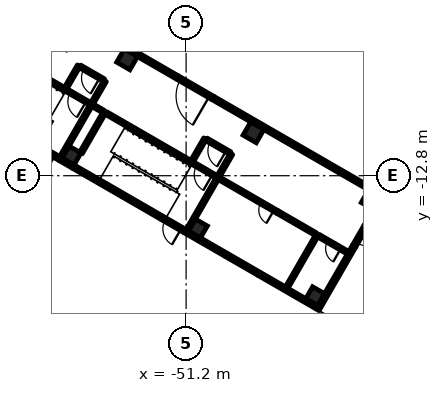
"""IFC4 building model, lengths in metres.
Left out: names, types, materials, properties, quantities, classifications, styles, units other than length and angle.
Written with IfcOpenShell. Run it as: python <this file> out.ifc"""

import sys

from ifc_helpers import new_model, si_unit, direction, frame, frame_2d, origin, origin_2d, place, context, subcontext, project, spatial, rectangle, extrude, element, fill, save


model = new_model("IFC4")
c1 = context("Model", 3, precision=1e-05, world=origin(), true_north=direction((0.0, 1.0)))
c2 = subcontext(c1, "Body", "Model", "MODEL_VIEW")
j1 = project(units=[si_unit("LENGTHUNIT", "METRE"), si_unit("PLANEANGLEUNIT", "RADIAN")], contexts=[c1])
p1 = place(None, origin())
s1 = spatial("IfcSite", under=j1, at=p1, CompositionType="ELEMENT")
p2 = place(p1, origin())
s2 = spatial("IfcBuilding", under=s1, at=p2, CompositionType="ELEMENT")
p3 = place(p2, origin())
s3 = spatial("IfcBuildingStorey", under=s2, at=p3, CompositionType="ELEMENT", Elevation=0.0)
p4 = place(p3, frame((-39.061, -14.399, -0.3), z_axis=(0.0, 0.0, 1.0), x_axis=(-0.5, -0.866025403784, 0.0)))
e1 = element("IfcColumn", 1, at=p4, inside=s3, PredefinedType="COLUMN", context=c2, shape_type="SweptSolid", body=[
    extrude(rectangle(XDim=0.9, YDim=0.9, at=origin_2d()), origin(), (0.0, 0.0, 1.0), 6.3),
])
for number, where, z_axis, x_axis in (
    (2, (-46.768, -9.949, -0.3), (0.0, 0.0, 1.0), (-0.5, -0.866, 0.0)),
    (3, (-55.082, -5.149, -0.3), (0.0, 0.0, 1.0), (-0.5, -0.866, 0.0)),
):
    element("IfcColumn", number, at=place(p3, frame(where, z_axis=z_axis, x_axis=x_axis)), inside=s3, PredefinedType="COLUMN", context=c2, shape_type="SweptSolid", body=[
        extrude(rectangle(XDim=1.0, YDim=1.0, at=origin_2d()), origin(), (0.0, 0.0, 1.0), 6.3),
    ])
for number, where, z_axis, x_axis in (
    (4, (-42.71, -20.721, -0.3), (0.0, 0.0, 1.0), (-0.5, -0.866, 0.0)),
    (5, (-50.418, -16.271, -0.3), (0.0, 0.0, 1.0), (-0.5, -0.866, 0.0)),
    (6, (-58.732, -11.471, -0.3), (0.0, 0.0, 1.0), (-0.5, -0.866, 0.0)),
):
    element("IfcColumn", number, at=place(p3, frame(where, z_axis=z_axis, x_axis=x_axis)), inside=s3, PredefinedType="COLUMN", context=c2, shape_type="SweptSolid", body=[
        extrude(rectangle(XDim=0.9, YDim=0.9, at=origin_2d()), origin(), (0.0, 0.0, 1.0), 6.3),
    ])
p5 = place(p3, frame((-38.988, -15.423, 0.0), z_axis=(0.0, 0.0, 1.0), x_axis=(-0.500077740698, -0.865980515519, 0.0)))
e7 = element("IfcWall", 7, at=p5, inside=s3, PredefinedType="SOLIDWALL", context=c2, shape_type="SweptSolid", body=[
    extrude(rectangle(XDim=2.3, YDim=0.25, at=frame_2d((1.15, 0.0))), origin(), (0.0, 0.0, 1.0), 5.7),
])
p6 = place(p5, frame((0.25, 0.0, 0.0)))
e8 = element("IfcOpeningElement", 8, at=p6, cuts=e7, PredefinedType="OPENING", context=c2, shape_type="SweptSolid", body=[
    extrude(rectangle(XDim=1.8, YDim=2.1, at=frame_2d((0.9, 1.05))), frame((0.0, 0.135, 0.0), z_axis=(0.0, -1.0, 0.0), x_axis=(1.0, 0.0, 0.0)), (0.0, 0.0, 1.0), 0.27),
])
p7 = place(p3, frame((-40.138, -17.414, 0.0), z_axis=(0.0, 0.0, 1.0), x_axis=(-0.499972286653, -0.866041403502, 0.0)))
e9 = element("IfcWall", 9, at=p7, inside=s3, PredefinedType="SOLIDWALL", context=c2, shape_type="SweptSolid", body=[
    extrude(rectangle(XDim=4.85, YDim=0.25, at=frame_2d((2.425, 0.0))), origin(), (0.0, 0.0, 1.0), 5.7),
])
p8 = place(p3, frame((-42.608, -21.444, 0.0), z_axis=(0.0, 0.0, 1.0), x_axis=(-0.866022959057, 0.500004234368, 0.0)))
e10 = element("IfcWall", 10, at=p8, inside=s3, PredefinedType="SOLIDWALL", context=c2, shape_type="SweptSolid", body=[
    extrude(rectangle(XDim=4.375, YDim=0.25, at=frame_2d((2.188, 0.0))), origin(), (0.0, 0.0, 1.0), 5.7),
])
p9 = place(p3, frame((-46.397, -19.256, 0.0), z_axis=(0.0, 0.0, 1.0), x_axis=(-0.866022959057, 0.500004234368, 0.0)))
e11 = element("IfcWall", 11, at=p9, inside=s3, PredefinedType="SOLIDWALL", context=c2, shape_type="SweptSolid", body=[
    extrude(rectangle(XDim=2.5, YDim=0.25, at=frame_2d((1.25, 0.0))), origin(), (0.0, 0.0, 1.0), 5.7),
])
p10 = place(p9, frame((0.25, 0.0, 0.3)))
e12 = element("IfcOpeningElement", 12, at=p10, cuts=e11, PredefinedType="OPENING", context=c2, shape_type="SweptSolid", body=[
    extrude(rectangle(XDim=2.0, YDim=2.4, at=frame_2d((1.0, 1.2))), frame((0.0, 0.135, 0.0), z_axis=(0.0, -1.0, 0.0), x_axis=(1.0, 0.0, 0.0)), (0.0, 0.0, 1.0), 0.27),
])
p11 = place(p3, frame((-48.562, -18.006, 0.0), z_axis=(0.0, 0.0, 1.0), x_axis=(-0.866015284814, 0.500017526161, 0.0)))
e13 = element("IfcWall", 13, at=p11, inside=s3, PredefinedType="SOLIDWALL", context=c2, shape_type="SweptSolid", body=[
    extrude(rectangle(XDim=3.175, YDim=0.25, at=frame_2d((1.588, 0.0))), origin(), (0.0, 0.0, 1.0), 5.7),
])
p12 = place(p3, frame((-51.312, -16.419, 0.0), z_axis=(0.0, 0.0, 1.0), x_axis=(-0.86605165483, 0.499954529098, 0.0)))
e14 = element("IfcWall", 14, at=p12, inside=s3, PredefinedType="SOLIDWALL", context=c2, shape_type="SweptSolid", body=[
    extrude(rectangle(XDim=1.7, YDim=0.25, at=frame_2d((0.85, 0.0))), origin(), (0.0, 0.0, 1.0), 5.7),
])
p13 = place(p12, frame((0.25, 0.0, 0.0)))
e15 = element("IfcOpeningElement", 15, at=p13, cuts=e14, PredefinedType="OPENING", context=c2, shape_type="SweptSolid", body=[
    extrude(rectangle(XDim=1.2, YDim=2.1, at=frame_2d((0.6, 1.05))), frame((0.0, 0.135, 0.0), z_axis=(0.0, -1.0, 0.0), x_axis=(1.0, 0.0, 0.0)), (0.0, 0.0, 1.0), 0.27),
])
p14 = place(p3, frame((-52.784, -15.569, 0.0), z_axis=(0.0, 0.0, 1.0), x_axis=(-0.866026575979, 0.499997969693, 0.0)))
e16 = element("IfcWall", 16, at=p14, inside=s3, PredefinedType="SOLIDWALL", context=c2, shape_type="SweptSolid", body=[
    extrude(rectangle(XDim=6.75, YDim=0.25, at=frame_2d((3.375, 0.0))), origin(), (0.0, 0.0, 1.0), 5.7),
])
p15 = place(p3, frame((-59.496, -11.694, 0.0), z_axis=(0.0, 0.0, 1.0), x_axis=(-0.866000971088, 0.500042316284, 0.0)))
e17 = element("IfcWall", 17, at=p15, inside=s3, PredefinedType="SOLIDWALL", context=c2, shape_type="SweptSolid", body=[
    extrude(rectangle(XDim=1.85, YDim=0.25, at=frame_2d((0.925, 0.0))), origin(), (0.0, 0.0, 1.0), 5.7),
])
p16 = place(p15, frame((0.4, 0.0, 0.0)))
e18 = element("IfcOpeningElement", 18, at=p16, cuts=e17, PredefinedType="OPENING", context=c2, shape_type="SweptSolid", body=[
    extrude(rectangle(XDim=1.2, YDim=2.1, at=frame_2d((0.6, 1.05))), frame((0.0, 0.135, 0.0), z_axis=(0.0, -1.0, 0.0), x_axis=(1.0, 0.0, 0.0)), (0.0, 0.0, 1.0), 0.27),
])
p17 = place(p3, frame((-58.63, -12.194, 0.0), z_axis=(0.0, 0.0, 1.0), x_axis=(-0.866010750942, 0.50002537861, 0.0)))
e19 = element("IfcWall", 19, at=p17, inside=s3, PredefinedType="SOLIDWALL", context=c2, shape_type="SweptSolid", body=[
    extrude(rectangle(XDim=1.0, YDim=0.25, at=frame_2d((0.5, 0.0))), origin(), (0.0, 0.0, 1.0), 5.7),
])
p18 = place(p3, frame((-49.119, -12.921, 0.0), z_axis=(0.0, 0.0, 1.0), x_axis=(-0.49999894854, -0.866026010844, 0.0)))
e20 = element("IfcWall", 20, at=p18, inside=s3, PredefinedType="SOLIDWALL", context=c2, shape_type="SweptSolid", body=[
    extrude(rectangle(XDim=4.0, YDim=0.2, at=frame_2d((2.0, 0.0))), origin(), (0.0, 0.0, 1.0), 5.7),
])
p19 = place(p3, frame((-56.567, -8.621, 0.0), z_axis=(0.0, 0.0, 1.0), x_axis=(-0.499933790963, -0.866063626216, 0.0)))
e21 = element("IfcWall", 21, at=p19, inside=s3, PredefinedType="SOLIDWALL", context=c2, shape_type="SweptSolid", body=[
    extrude(rectangle(XDim=3.1, YDim=0.2, at=frame_2d((1.55, 0.0))), origin(), (0.0, 0.0, 1.0), 5.7),
])
p20 = place(p3, frame((-57.433, -8.121, 0.0), z_axis=(0.0, 0.0, 1.0), x_axis=(-0.49999894854, -0.866026010844, 0.0)))
e22 = element("IfcWall", 22, at=p20, inside=s3, PredefinedType="SOLIDWALL", context=c2, shape_type="SweptSolid", body=[
    extrude(rectangle(XDim=4.0, YDim=0.2, at=frame_2d((2.0, 0.0))), origin(), (0.0, 0.0, 1.0), 5.7),
])
p21 = place(p3, frame((-49.206, -12.871, 0.0), z_axis=(0.0, 0.0, 1.0), x_axis=(-0.866036909293, 0.499980071345, 0.0)))
e23 = element("IfcWall", 23, at=p21, inside=s3, PredefinedType="SOLIDWALL", context=c2, shape_type="SweptSolid", body=[
    extrude(rectangle(XDim=1.75, YDim=0.2, at=frame_2d((0.875, 0.0))), origin(), (0.0, 0.0, 1.0), 5.7),
])
p22 = place(p21, frame((0.3, 0.0, 0.0)))
e24 = element("IfcOpeningElement", 24, at=p22, cuts=e23, PredefinedType="OPENING", context=c2, shape_type="SweptSolid", body=[
    extrude(rectangle(XDim=1.2, YDim=2.1, at=frame_2d((0.6, 1.05))), frame((0.0, 0.11, 0.0), z_axis=(0.0, -1.0, 0.0), x_axis=(1.0, 0.0, 0.0)), (0.0, 0.0, 1.0), 0.22),
])
p23 = place(p3, frame((-50.722, -11.996, 0.0), z_axis=(0.0, 0.0, 1.0), x_axis=(-0.866027239912, 0.49999681972, 0.0)))
e25 = element("IfcWall", 25, at=p23, inside=s3, PredefinedType="SOLIDWALL", context=c2, shape_type="SweptSolid", body=[
    extrude(rectangle(XDim=6.65, YDim=0.2, at=frame_2d((3.325, 0.0))), origin(), (0.0, 0.0, 1.0), 5.7),
])
p24 = place(p3, frame((-57.52, -8.071, 0.0), z_axis=(0.0, 0.0, 1.0), x_axis=(-0.866002029911, 0.500040482552, 0.0)))
e26 = element("IfcWall", 26, at=p24, inside=s3, PredefinedType="SOLIDWALL", context=c2, shape_type="SweptSolid", body=[
    extrude(rectangle(XDim=1.75, YDim=0.2, at=frame_2d((0.875, 0.0))), origin(), (0.0, 0.0, 1.0), 5.7),
])
p25 = place(p24, frame((0.3, 0.0, 0.0)))
e27 = element("IfcOpeningElement", 27, at=p25, cuts=e26, PredefinedType="OPENING", context=c2, shape_type="SweptSolid", body=[
    extrude(rectangle(XDim=1.2, YDim=2.1, at=frame_2d((0.6, 1.05))), frame((0.0, 0.11, 0.0), z_axis=(0.0, -1.0, 0.0), x_axis=(1.0, 0.0, 0.0)), (0.0, 0.0, 1.0), 0.22),
])
p26 = place(p3, frame((-59.035, -7.196, 0.0), z_axis=(0.0, 0.0, 1.0), x_axis=(-0.866027239912, 0.49999681972, 0.0)))
e28 = element("IfcWall", 28, at=p26, inside=s3, PredefinedType="SOLIDWALL", context=c2, shape_type="SweptSolid", body=[
    extrude(rectangle(XDim=6.65, YDim=0.2, at=frame_2d((3.325, 0.0))), origin(), (0.0, 0.0, 1.0), 5.7),
])
for number, where, z_axis, x_axis in (
    (29, (-48.219, -11.363, 0.0), (0.0, 0.0, 1.0), (-0.5, -0.866, 0.0)),
    (30, (-49.951, -10.363, 0.0), (0.0, 0.0, 1.0), (-0.5, -0.866, 0.0)),
):
    element("IfcWall", number, at=place(p3, frame(where, z_axis=z_axis, x_axis=x_axis)), inside=s3, PredefinedType="PARTITIONING", context=c2, shape_type="SweptSolid", body=[
        extrude(rectangle(XDim=1.7, YDim=0.2, at=frame_2d((0.85, 0.0))), origin(), (0.0, 0.0, 1.0), 5.1),
    ])
for number, where, z_axis, x_axis in (
    (31, (-56.533, -6.562, 0.0), (0.0, 0.0, 1.0), (-0.5, -0.866, 0.0)),
    (32, (-58.265, -5.562, 0.0), (0.0, 0.0, 1.0), (-0.5, -0.866, 0.0)),
):
    element("IfcWall", number, at=place(p3, frame(where, z_axis=z_axis, x_axis=x_axis)), inside=s3, PredefinedType="PARTITIONING", context=c2, shape_type="SweptSolid", body=[
        extrude(rectangle(XDim=1.7, YDim=0.2, at=frame_2d((0.85, 0.0))), origin(), (0.0, 0.0, 1.0), 5.1),
    ])
p27 = place(p3, frame((-48.306, -11.312, 0.0), z_axis=(0.0, 0.0, 1.0), x_axis=(-0.866047807691, 0.499961193289, 0.0)))
e33 = element("IfcWall", 33, at=p27, inside=s3, PredefinedType="PARTITIONING", context=c2, shape_type="SweptSolid", body=[
    extrude(rectangle(XDim=1.8, YDim=0.2, at=frame_2d((0.9, 0.0))), origin(), (0.0, 0.0, 1.0), 5.1),
])
p28 = place(p27, frame((0.3, 0.0, 0.0)))
e34 = element("IfcOpeningElement", 34, at=p28, cuts=e33, PredefinedType="OPENING", context=c2, shape_type="SweptSolid", body=[
    extrude(rectangle(XDim=1.2, YDim=2.1, at=frame_2d((0.6, 1.05))), frame((0.0, 0.11, 0.0), z_axis=(0.0, -1.0, 0.0), x_axis=(1.0, 0.0, 0.0)), (0.0, 0.0, 1.0), 0.22),
])
p29 = place(p3, frame((-56.62, -6.513, 0.0), z_axis=(0.0, 0.0, 1.0), x_axis=(-0.865989075817, 0.500062916607, 0.0)))
e35 = element("IfcWall", 35, at=p29, inside=s3, PredefinedType="PARTITIONING", context=c2, shape_type="SweptSolid", body=[
    extrude(rectangle(XDim=1.8, YDim=0.2, at=frame_2d((0.9, 0.0))), origin(), (0.0, 0.0, 1.0), 5.1),
])
p30 = place(p29, frame((0.3, 0.0, 0.0)))
e36 = element("IfcOpeningElement", 36, at=p30, cuts=e35, PredefinedType="OPENING", context=c2, shape_type="SweptSolid", body=[
    extrude(rectangle(XDim=1.2, YDim=2.1, at=frame_2d((0.6, 1.05))), frame((0.0, 0.11, 0.0), z_axis=(0.0, -1.0, 0.0), x_axis=(1.0, 0.0, 0.0)), (0.0, 0.0, 1.0), 0.22),
])
p31 = place(p3, frame((-38.358, -14.083, 0.0), z_axis=(0.0, 0.0, 1.0), x_axis=(-0.866025499775, 0.499999833739, 0.0)))
e37 = element("IfcWall", 37, at=p31, inside=s3, PredefinedType="SOLIDWALL", context=c2, shape_type="SweptSolid", body=[
    extrude(rectangle(XDim=12.8, YDim=0.25, at=frame_2d((6.4, 0.0))), origin(), (0.0, 0.0, 1.0), 5.1),
])
p32 = place(p3, frame((-49.443, -7.683, 0.0), z_axis=(0.0, 0.0, 1.0), x_axis=(-0.866019956843, 0.50000943426, 0.0)))
e38 = element("IfcWall", 38, at=p32, inside=s3, PredefinedType="SOLIDWALL", context=c2, shape_type="SweptSolid", body=[
    extrude(rectangle(XDim=2.7, YDim=0.25, at=frame_2d((1.35, 0.0))), origin(), (0.0, 0.0, 1.0), 5.1),
])
p33 = place(p32, frame((0.25, 0.0, 0.0)))
e39 = element("IfcOpeningElement", 39, at=p33, cuts=e38, PredefinedType="OPENING", context=c2, shape_type="SweptSolid", body=[
    extrude(rectangle(XDim=2.2, YDim=2.1, at=frame_2d((1.1, 1.05))), frame((0.0, 0.135, 0.0), z_axis=(0.0, -1.0, 0.0), x_axis=(1.0, 0.0, 0.0)), (0.0, 0.0, 1.0), 0.27),
])
p34 = place(p3, frame((-51.782, -6.333, 0.0), z_axis=(0.0, 0.0, 1.0), x_axis=(-0.866028853923, 0.499994024137, 0.0)))
e40 = element("IfcWall", 40, at=p34, inside=s3, PredefinedType="SOLIDWALL", context=c2, shape_type="SweptSolid", body=[
    extrude(rectangle(XDim=6.9, YDim=0.25, at=frame_2d((3.45, 0.0))), origin(), (0.0, 0.0, 1.0), 5.1),
])
p35 = place(p3, frame((-42.581, -16.696, 0.0), z_axis=(0.0, 0.0, 1.0), x_axis=(-0.49999894854, -0.866026010844, 0.0)))
e41 = element("IfcWall", 41, at=p35, inside=s3, PredefinedType="PARTITIONING", context=c2, shape_type="SweptSolid", body=[
    extrude(rectangle(XDim=4.0, YDim=0.2, at=frame_2d((2.0, 0.0))), origin(), (0.0, 0.0, 1.0), 5.1),
])
p36 = place(p3, frame((-40.546, -17.871, 0.0), z_axis=(0.0, 0.0, 1.0), x_axis=(-0.866017533419, 0.500013631625, 0.0)))
e42 = element("IfcWall", 42, at=p36, inside=s3, PredefinedType="PARTITIONING", context=c2, shape_type="SweptSolid", body=[
    extrude(rectangle(XDim=2.25, YDim=0.2, at=frame_2d((1.125, 0.0))), origin(), (0.0, 0.0, 1.0), 5.1),
])
p37 = place(p36, frame((0.55, 0.0, 0.0)))
e43 = element("IfcOpeningElement", 43, at=p37, cuts=e42, PredefinedType="OPENING", context=c2, shape_type="SweptSolid", body=[
    extrude(rectangle(XDim=1.0, YDim=2.1, at=frame_2d((0.5, 1.05))), frame((0.0, 0.11, 0.0), z_axis=(0.0, -1.0, 0.0), x_axis=(1.0, 0.0, 0.0)), (0.0, 0.0, 1.0), 0.22),
])
p38 = place(p3, frame((-42.667, -16.646, 0.0), z_axis=(0.0, 0.0, 1.0), x_axis=(-0.86601045545, 0.500025890382, 0.0)))
e44 = element("IfcWall", 44, at=p38, inside=s3, PredefinedType="PARTITIONING", context=c2, shape_type="SweptSolid", body=[
    extrude(rectangle(XDim=2.925, YDim=0.2, at=frame_2d((1.462, 0.0))), origin(), (0.0, 0.0, 1.0), 5.1),
])
p39 = place(p3, frame((-45.201, -15.184, 0.0), z_axis=(0.0, 0.0, 1.0), x_axis=(-0.866031096941, 0.499990139034, 0.0)))
e45 = element("IfcWall", 45, at=p39, inside=s3, PredefinedType="PARTITIONING", context=c2, shape_type="SweptSolid", body=[
    extrude(rectangle(XDim=1.5, YDim=0.2, at=frame_2d((0.75, 0.0))), origin(), (0.0, 0.0, 1.0), 5.1),
])
p40 = place(p39, frame((0.25, 0.0, 0.0)))
e46 = element("IfcOpeningElement", 46, at=p40, cuts=e45, PredefinedType="OPENING", context=c2, shape_type="SweptSolid", body=[
    extrude(rectangle(XDim=1.0, YDim=2.1, at=frame_2d((0.5, 1.05))), frame((0.0, 0.11, 0.0), z_axis=(0.0, -1.0, 0.0), x_axis=(1.0, 0.0, 0.0)), (0.0, 0.0, 1.0), 0.22),
])
p41 = place(p3, frame((-46.5, -14.434, 0.0), z_axis=(0.0, 0.0, 1.0), x_axis=(-0.866046596414, 0.499963291492, 0.0)))
e47 = element("IfcWall", 47, at=p41, inside=s3, PredefinedType="PARTITIONING", context=c2, shape_type="SweptSolid", body=[
    extrude(rectangle(XDim=2.925, YDim=0.2, at=frame_2d((1.462, 0.0))), origin(), (0.0, 0.0, 1.0), 5.1),
])
p42 = place(p3, frame((-56.654, -8.571, 0.0), z_axis=(0.0, 0.0, 1.0), x_axis=(-0.866094119867, 0.499880961361, 0.0)))
e48 = element("IfcWall", 48, at=p42, inside=s3, PredefinedType="PARTITIONING", context=c2, shape_type="SweptSolid", body=[
    extrude(rectangle(XDim=0.8, YDim=0.2, at=frame_2d((0.4, 0.0))), origin(), (0.0, 0.0, 1.0), 5.1),
])
p43 = place(p6, origin())
e49 = element("IfcDoor", 49, at=p43, inside=s3, OperationType="DOUBLE_DOOR_SINGLE_SWING", PredefinedType="DOOR", context=c2, shape_type="SweptSolid", body=[
    extrude(rectangle(XDim=1.8, YDim=2.1, at=frame_2d((0.9, 1.05))), frame((0.0, 0.025, 0.0), z_axis=(0.0, -1.0, 0.0), x_axis=(1.0, 0.0, 0.0)), (0.0, 0.0, 1.0), 0.05),
])
fill(e8, e49)
p44 = place(p10, origin())
e50 = element("IfcWindow", 50, at=p44, inside=s3, PartitioningType="SINGLE_PANEL", PredefinedType="WINDOW", context=c2, shape_type="SweptSolid", body=[
    extrude(rectangle(XDim=2.0, YDim=2.4, at=frame_2d((1.0, 1.2))), frame((0.0, 0.03, 0.0), z_axis=(0.0, -1.0, 0.0), x_axis=(1.0, 0.0, 0.0)), (0.0, 0.0, 1.0), 0.06),
])
fill(e12, e50)
p45 = place(p13, origin())
e51 = element("IfcDoor", 51, at=p45, inside=s3, OperationType="SINGLE_SWING_LEFT", PredefinedType="DOOR", context=c2, shape_type="SweptSolid", body=[
    extrude(rectangle(XDim=1.2, YDim=2.1, at=frame_2d((0.6, 1.05))), frame((0.0, 0.025, 0.0), z_axis=(0.0, -1.0, 0.0), x_axis=(1.0, 0.0, 0.0)), (0.0, 0.0, 1.0), 0.05),
])
fill(e15, e51)
p46 = place(p16, origin())
e52 = element("IfcDoor", 52, at=p46, inside=s3, OperationType="SINGLE_SWING_LEFT", PredefinedType="DOOR", context=c2, shape_type="SweptSolid", body=[
    extrude(rectangle(XDim=1.2, YDim=2.1, at=frame_2d((0.6, 1.05))), frame((0.0, 0.025, 0.0), z_axis=(0.0, -1.0, 0.0), x_axis=(1.0, 0.0, 0.0)), (0.0, 0.0, 1.0), 0.05),
])
fill(e18, e52)
p47 = place(p22, origin())
e53 = element("IfcDoor", 53, at=p47, inside=s3, OperationType="SINGLE_SWING_LEFT", PredefinedType="DOOR", context=c2, shape_type="SweptSolid", body=[
    extrude(rectangle(XDim=1.2, YDim=2.1, at=frame_2d((0.6, 1.05))), frame((0.0, 0.025, 0.0), z_axis=(0.0, -1.0, 0.0), x_axis=(1.0, 0.0, 0.0)), (0.0, 0.0, 1.0), 0.05),
])
fill(e24, e53)
p48 = place(p25, origin())
e54 = element("IfcDoor", 54, at=p48, inside=s3, OperationType="SINGLE_SWING_LEFT", PredefinedType="DOOR", context=c2, shape_type="SweptSolid", body=[
    extrude(rectangle(XDim=1.2, YDim=2.1, at=frame_2d((0.6, 1.05))), frame((0.0, 0.025, 0.0), z_axis=(0.0, -1.0, 0.0), x_axis=(1.0, 0.0, 0.0)), (0.0, 0.0, 1.0), 0.05),
])
fill(e27, e54)
p49 = place(p28, origin())
e55 = element("IfcDoor", 55, at=p49, inside=s3, OperationType="SINGLE_SWING_LEFT", PredefinedType="DOOR", context=c2, shape_type="SweptSolid", body=[
    extrude(rectangle(XDim=1.2, YDim=2.1, at=frame_2d((0.6, 1.05))), frame((0.0, 0.025, 0.0), z_axis=(0.0, -1.0, 0.0), x_axis=(1.0, 0.0, 0.0)), (0.0, 0.0, 1.0), 0.05),
])
fill(e34, e55)
p50 = place(p30, origin())
e56 = element("IfcDoor", 56, at=p50, inside=s3, OperationType="SINGLE_SWING_LEFT", PredefinedType="DOOR", context=c2, shape_type="SweptSolid", body=[
    extrude(rectangle(XDim=1.2, YDim=2.1, at=frame_2d((0.6, 1.05))), frame((0.0, 0.025, 0.0), z_axis=(0.0, -1.0, 0.0), x_axis=(1.0, 0.0, 0.0)), (0.0, 0.0, 1.0), 0.05),
])
fill(e36, e56)
p51 = place(p33, origin())
e57 = element("IfcDoor", 57, at=p51, inside=s3, OperationType="DOUBLE_DOOR_SINGLE_SWING", PredefinedType="DOOR", context=c2, shape_type="SweptSolid", body=[
    extrude(rectangle(XDim=2.2, YDim=2.1, at=frame_2d((1.1, 1.05))), frame((0.0, 0.025, 0.0), z_axis=(0.0, -1.0, 0.0), x_axis=(1.0, 0.0, 0.0)), (0.0, 0.0, 1.0), 0.05),
])
fill(e39, e57)
p52 = place(p37, origin())
e58 = element("IfcDoor", 58, at=p52, inside=s3, OperationType="SINGLE_SWING_LEFT", PredefinedType="DOOR", context=c2, shape_type="SweptSolid", body=[
    extrude(rectangle(XDim=1.0, YDim=2.1, at=frame_2d((0.5, 1.05))), frame((0.0, 0.025, 0.0), z_axis=(0.0, -1.0, 0.0), x_axis=(1.0, 0.0, 0.0)), (0.0, 0.0, 1.0), 0.05),
])
fill(e43, e58)
p53 = place(p40, origin())
e59 = element("IfcDoor", 59, at=p53, inside=s3, OperationType="SINGLE_SWING_LEFT", PredefinedType="DOOR", context=c2, shape_type="SweptSolid", body=[
    extrude(rectangle(XDim=1.0, YDim=2.1, at=frame_2d((0.5, 1.05))), frame((0.0, 0.025, 0.0), z_axis=(0.0, -1.0, 0.0), x_axis=(1.0, 0.0, 0.0)), (0.0, 0.0, 1.0), 0.05),
])
fill(e46, e59)
save(model, sys.argv[1])
